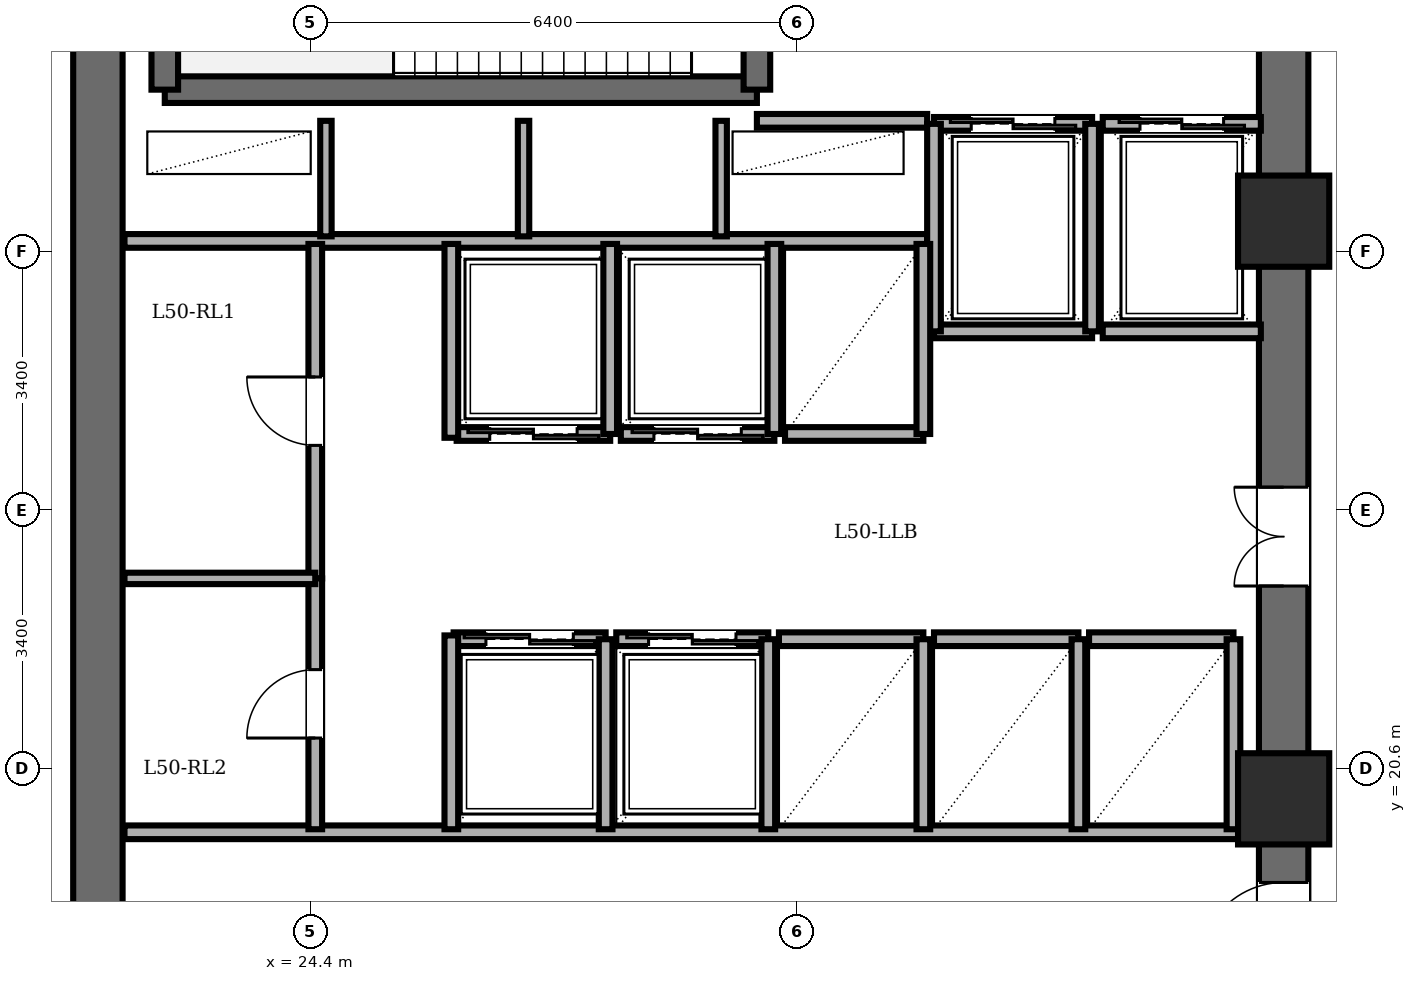
"""IFC4 building model, lengths in metres.
Left out: names, types, materials, properties, quantities, classifications, styles, units other than length and angle.
Written with IfcOpenShell. Run it as: python <this file> out.ifc"""

import sys

from ifc_helpers import new_model, si_unit, direction, frame, frame_2d, origin, origin_2d, place, context, subcontext, project, spatial, rectangle, extrude, element, fill, save


model = new_model("IFC4")
c1 = context("Model", 3, precision=1e-05, world=origin(), true_north=direction((0.0, 1.0)))
c2 = subcontext(c1, "Body", "Model", "MODEL_VIEW")
j1 = project(units=[si_unit("LENGTHUNIT", "METRE"), si_unit("PLANEANGLEUNIT", "RADIAN")], contexts=[c1])
p1 = place(None, origin())
s1 = spatial("IfcSite", under=j1, at=p1, CompositionType="ELEMENT")
p2 = place(p1, origin())
s2 = spatial("IfcBuilding", under=s1, at=p2, CompositionType="ELEMENT")
p3 = place(p2, frame((0.0, 0.0, 190.6)))
s3 = spatial("IfcBuildingStorey", under=s2, at=p3, CompositionType="ELEMENT", Elevation=190.6)
for number, where, z_axis, x_axis in (
    (1, (37.2, 20.2, 0.0), (0.0, 0.0, 1.0), (1.0, 0.0, 0.0)),
    (2, (37.2, 27.8, 0.0), (0.0, 0.0, 1.0), (1.0, 0.0, 0.0)),
):
    element("IfcColumn", number, at=place(p3, frame(where, z_axis=z_axis, x_axis=x_axis)), inside=s3, PredefinedType="COLUMN", context=c2, shape_type="SweptSolid", body=[
        extrude(rectangle(XDim=1.2, YDim=1.2, at=origin_2d()), origin(), (0.0, 0.0, 1.0), 5.6),
    ])
p4 = place(p3, frame((21.6, 14.4, 0.0), z_axis=(0.0, 0.0, 1.0), x_axis=(0.0, 1.0, 0.0)))
e3 = element("IfcWall", 3, at=p4, inside=s3, PredefinedType="SHEAR", context=c2, shape_type="SweptSolid", body=[
    extrude(rectangle(XDim=19.2, YDim=0.65, at=frame_2d((9.6, 0.0))), origin(), (0.0, 0.0, 1.0), 5.36),
])
p5 = place(p3, frame((37.2, 14.4, 0.0), z_axis=(0.0, 0.0, 1.0), x_axis=(0.0, 1.0, 0.0)))
e4 = element("IfcWall", 4, at=p5, inside=s3, PredefinedType="SHEAR", context=c2, shape_type="SweptSolid", body=[
    extrude(rectangle(XDim=19.2, YDim=0.65, at=frame_2d((9.6, 0.0))), origin(), (0.0, 0.0, 1.0), 5.36),
])
p6 = place(p5, frame((15.8, 0.0, 0.0)))
e5 = element("IfcOpeningElement", 5, at=p6, cuts=e4, PredefinedType="OPENING", context=c2, shape_type="SweptSolid", body=[
    extrude(rectangle(XDim=1.15, YDim=2.15, at=frame_2d((0.575, 1.075))), frame((0.0, 0.335, 0.0), z_axis=(0.0, -1.0, 0.0), x_axis=(1.0, 0.0, 0.0)), (0.0, 0.0, 1.0), 0.67),
])
p7 = place(p5, frame((3.6, 0.0, 0.0)))
e6 = element("IfcOpeningElement", 6, at=p7, cuts=e4, PredefinedType="OPENING", context=c2, shape_type="SweptSolid", body=[
    extrude(rectangle(XDim=1.1, YDim=2.15, at=frame_2d((0.55, 1.075))), frame((0.0, 0.335, 0.0), z_axis=(0.0, -1.0, 0.0), x_axis=(1.0, 0.0, 0.0)), (0.0, 0.0, 1.0), 0.67),
])
p8 = place(p5, frame((8.6, 0.0, 0.0)))
e7 = element("IfcOpeningElement", 7, at=p8, cuts=e4, PredefinedType="OPENING", context=c2, shape_type="SweptSolid", body=[
    extrude(rectangle(XDim=1.3, YDim=2.2, at=frame_2d((0.65, 1.1))), frame((0.0, 0.335, 0.0), z_axis=(0.0, -1.0, 0.0), x_axis=(1.0, 0.0, 0.0)), (0.0, 0.0, 1.0), 0.67),
])
p9 = place(p3, frame((22.48, 29.53, 0.0), z_axis=(0.0, 0.0, 1.0), x_axis=(1.0, 0.0, 0.0)))
e8 = element("IfcWall", 8, at=p9, inside=s3, PredefinedType="SOLIDWALL", context=c2, shape_type="SweptSolid", body=[
    extrude(rectangle(XDim=7.79, YDim=0.35, at=frame_2d((3.895, 0.0))), origin(), (0.0, 0.0, 1.0), 5.36),
])
p10 = place(p3, frame((22.48, 29.53, 0.0), z_axis=(0.0, 0.0, 1.0), x_axis=(0.0, 1.0, 0.0)))
e9 = element("IfcWall", 9, at=p10, inside=s3, PredefinedType="SOLIDWALL", context=c2, shape_type="SweptSolid", body=[
    extrude(rectangle(XDim=3.58, YDim=0.35, at=frame_2d((1.79, 0.0))), origin(), (0.0, 0.0, 1.0), 5.36),
])
p11 = place(p3, frame((30.27, 29.53, 0.0), z_axis=(0.0, 0.0, 1.0), x_axis=(0.0, 1.0, 0.0)))
e10 = element("IfcWall", 10, at=p11, inside=s3, PredefinedType="SOLIDWALL", context=c2, shape_type="SweptSolid", body=[
    extrude(rectangle(XDim=3.58, YDim=0.35, at=frame_2d((1.79, 0.0))), origin(), (0.0, 0.0, 1.0), 5.36),
])
p12 = place(p11, frame((1.25, 0.0, 0.0)))
e11 = element("IfcOpeningElement", 11, at=p12, cuts=e10, PredefinedType="OPENING", context=c2, shape_type="SweptSolid", body=[
    extrude(rectangle(XDim=1.1, YDim=2.15, at=frame_2d((0.55, 1.075))), frame((0.0, 0.185, 0.0), z_axis=(0.0, -1.0, 0.0), x_axis=(1.0, 0.0, 0.0)), (0.0, 0.0, 1.0), 0.37),
])
p13 = place(p3, frame((30.27, 29.12, 0.0), z_axis=(0.0, 0.0, 1.0), x_axis=(1.0, 0.0, 0.0)))
e12 = element("IfcWall", 12, at=p13, inside=s3, PredefinedType="PARTITIONING", context=c2, shape_type="SweptSolid", body=[
    extrude(rectangle(XDim=2.24, YDim=0.18, at=frame_2d((1.12, 0.0))), origin(), (0.0, 0.0, 1.0), 5.36),
])
p14 = place(p3, frame((21.95, 27.54, 0.0), z_axis=(0.0, 0.0, 1.0), x_axis=(1.0, 0.0, 0.0)))
e13 = element("IfcWall", 13, at=p14, inside=s3, PredefinedType="PARTITIONING", context=c2, shape_type="SweptSolid", body=[
    extrude(rectangle(XDim=10.56, YDim=0.18, at=frame_2d((5.28, 0.0))), origin(), (0.0, 0.0, 1.0), 5.36),
])
for number, where, z_axis, x_axis in (
    (14, (24.6, 27.6, 0.0), (0.0, 0.0, 1.0), (0.0, 1.0, 0.0)),
    (15, (27.2, 27.6, 0.0), (0.0, 0.0, 1.0), (0.0, 1.0, 0.0)),
    (16, (29.8, 27.6, 0.0), (0.0, 0.0, 1.0), (0.0, 1.0, 0.0)),
):
    element("IfcWall", number, at=place(p3, frame(where, z_axis=z_axis, x_axis=x_axis)), inside=s3, PredefinedType="PARTITIONING", context=c2, shape_type="SweptSolid", body=[
        extrude(rectangle(XDim=1.52, YDim=0.15, at=frame_2d((0.76, 0.0))), origin(), (0.0, 0.0, 1.0), 5.36),
    ])
p15 = place(p3, frame((21.95, 19.76, 0.0), z_axis=(0.0, 0.0, 1.0), x_axis=(1.0, 0.0, 0.0)))
e17 = element("IfcWall", 17, at=p15, inside=s3, PredefinedType="PARTITIONING", context=c2, shape_type="SweptSolid", body=[
    extrude(rectangle(XDim=14.87, YDim=0.18, at=frame_2d((7.435, 0.0))), origin(), (0.0, 0.0, 1.0), 5.36),
])
p16 = place(p3, frame((32.6, 29.08, 0.0), z_axis=(0.0, 0.0, 1.0), x_axis=(1.0, 0.0, 0.0)))
e18 = element("IfcWall", 18, at=p16, inside=s3, PredefinedType="PARTITIONING", context=c2, shape_type="SweptSolid", body=[
    extrude(rectangle(XDim=2.08, YDim=0.18, at=frame_2d((1.04, 0.0))), origin(), (0.0, 0.0, 1.0), 5.36),
])
p17 = place(p16, frame((0.49, 0.0, 0.0)))
e19 = element("IfcOpeningElement", 19, at=p17, cuts=e18, PredefinedType="OPENING", context=c2, shape_type="SweptSolid", body=[
    extrude(rectangle(XDim=1.1, YDim=2.2, at=frame_2d((0.55, 1.1))), frame((0.0, 0.1, 0.0), z_axis=(0.0, -1.0, 0.0), x_axis=(1.0, 0.0, 0.0)), (0.0, 0.0, 1.0), 0.2),
])
p18 = place(p3, frame((34.68, 26.35, 0.0), z_axis=(0.0, 0.0, 1.0), x_axis=(-1.0, 0.0, 0.0)))
e20 = element("IfcWall", 20, at=p18, inside=s3, PredefinedType="PARTITIONING", context=c2, shape_type="SweptSolid", body=[
    extrude(rectangle(XDim=2.08, YDim=0.18, at=frame_2d((1.04, 0.0))), origin(), (0.0, 0.0, 1.0), 5.36),
])
for number, where, z_axis, x_axis in (
    (21, (34.68, 26.35, 0.0), (0.0, 0.0, 1.0), (0.0, 1.0, 0.0)),
    (22, (32.6, 29.08, 0.0), (0.0, 0.0, 1.0), (0.0, -1.0, 0.0)),
):
    element("IfcWall", number, at=place(p3, frame(where, z_axis=z_axis, x_axis=x_axis)), inside=s3, PredefinedType="PARTITIONING", context=c2, shape_type="SweptSolid", body=[
        extrude(rectangle(XDim=2.73, YDim=0.18, at=frame_2d((1.365, 0.0))), origin(), (0.0, 0.0, 1.0), 5.36),
    ])
p19 = place(p3, frame((34.82, 29.08, 0.0), z_axis=(0.0, 0.0, 1.0), x_axis=(1.0, 0.0, 0.0)))
e23 = element("IfcWall", 23, at=p19, inside=s3, PredefinedType="PARTITIONING", context=c2, shape_type="SweptSolid", body=[
    extrude(rectangle(XDim=2.08, YDim=0.18, at=frame_2d((1.04, 0.0))), origin(), (0.0, 0.0, 1.0), 5.36),
])
p20 = place(p19, frame((0.49, 0.0, 0.0)))
e24 = element("IfcOpeningElement", 24, at=p20, cuts=e23, PredefinedType="OPENING", context=c2, shape_type="SweptSolid", body=[
    extrude(rectangle(XDim=1.1, YDim=2.2, at=frame_2d((0.55, 1.1))), frame((0.0, 0.1, 0.0), z_axis=(0.0, -1.0, 0.0), x_axis=(1.0, 0.0, 0.0)), (0.0, 0.0, 1.0), 0.2),
])
p21 = place(p3, frame((36.9, 26.35, 0.0), z_axis=(0.0, 0.0, 1.0), x_axis=(-1.0, 0.0, 0.0)))
e25 = element("IfcWall", 25, at=p21, inside=s3, PredefinedType="PARTITIONING", context=c2, shape_type="SweptSolid", body=[
    extrude(rectangle(XDim=2.08, YDim=0.18, at=frame_2d((1.04, 0.0))), origin(), (0.0, 0.0, 1.0), 5.36),
])
p22 = place(p3, frame((28.34, 25.0, 0.0), z_axis=(0.0, 0.0, 1.0), x_axis=(-1.0, 0.0, 0.0)))
e26 = element("IfcWall", 26, at=p22, inside=s3, PredefinedType="PARTITIONING", context=c2, shape_type="SweptSolid", body=[
    extrude(rectangle(XDim=2.02, YDim=0.18, at=frame_2d((1.01, 0.0))), origin(), (0.0, 0.0, 1.0), 5.36),
])
p23 = place(p22, frame((0.435, 0.0, 0.0)))
e27 = element("IfcOpeningElement", 27, at=p23, cuts=e26, PredefinedType="OPENING", context=c2, shape_type="SweptSolid", body=[
    extrude(rectangle(XDim=1.15, YDim=2.2, at=frame_2d((0.575, 1.1))), frame((0.0, 0.1, 0.0), z_axis=(0.0, -1.0, 0.0), x_axis=(1.0, 0.0, 0.0)), (0.0, 0.0, 1.0), 0.2),
])
p24 = place(p3, frame((28.34, 25.0, 0.0), z_axis=(0.0, 0.0, 1.0), x_axis=(0.0, 1.0, 0.0)))
e28 = element("IfcWall", 28, at=p24, inside=s3, PredefinedType="PARTITIONING", context=c2, shape_type="SweptSolid", body=[
    extrude(rectangle(XDim=2.5, YDim=0.18, at=frame_2d((1.25, 0.0))), origin(), (0.0, 0.0, 1.0), 5.36),
])
p25 = place(p3, frame((30.5, 25.0, 0.0), z_axis=(0.0, 0.0, 1.0), x_axis=(-1.0, 0.0, 0.0)))
e29 = element("IfcWall", 29, at=p25, inside=s3, PredefinedType="PARTITIONING", context=c2, shape_type="SweptSolid", body=[
    extrude(rectangle(XDim=2.02, YDim=0.18, at=frame_2d((1.01, 0.0))), origin(), (0.0, 0.0, 1.0), 5.36),
])
p26 = place(p25, frame((0.435, 0.0, 0.0)))
e30 = element("IfcOpeningElement", 30, at=p26, cuts=e29, PredefinedType="OPENING", context=c2, shape_type="SweptSolid", body=[
    extrude(rectangle(XDim=1.15, YDim=2.2, at=frame_2d((0.575, 1.1))), frame((0.0, 0.1, 0.0), z_axis=(0.0, -1.0, 0.0), x_axis=(1.0, 0.0, 0.0)), (0.0, 0.0, 1.0), 0.2),
])
p27 = place(p3, frame((30.5, 25.0, 0.0), z_axis=(0.0, 0.0, 1.0), x_axis=(0.0, 1.0, 0.0)))
e31 = element("IfcWall", 31, at=p27, inside=s3, PredefinedType="PARTITIONING", context=c2, shape_type="SweptSolid", body=[
    extrude(rectangle(XDim=2.5, YDim=0.18, at=frame_2d((1.25, 0.0))), origin(), (0.0, 0.0, 1.0), 5.36),
])
p28 = place(p3, frame((26.28, 22.3, 0.0), z_axis=(0.0, 0.0, 1.0), x_axis=(1.0, 0.0, 0.0)))
e32 = element("IfcWall", 32, at=p28, inside=s3, PredefinedType="PARTITIONING", context=c2, shape_type="SweptSolid", body=[
    extrude(rectangle(XDim=2.0, YDim=0.18, at=frame_2d((1.0, 0.0))), origin(), (0.0, 0.0, 1.0), 5.36),
])
p29 = place(p28, frame((0.425, 0.0, 0.0)))
e33 = element("IfcOpeningElement", 33, at=p29, cuts=e32, PredefinedType="OPENING", context=c2, shape_type="SweptSolid", body=[
    extrude(rectangle(XDim=1.15, YDim=2.2, at=frame_2d((0.575, 1.1))), frame((0.0, 0.1, 0.0), z_axis=(0.0, -1.0, 0.0), x_axis=(1.0, 0.0, 0.0)), (0.0, 0.0, 1.0), 0.2),
])
p30 = place(p3, frame((28.28, 19.8, 0.0), z_axis=(0.0, 0.0, 1.0), x_axis=(0.0, 1.0, 0.0)))
e34 = element("IfcWall", 34, at=p30, inside=s3, PredefinedType="PARTITIONING", context=c2, shape_type="SweptSolid", body=[
    extrude(rectangle(XDim=2.5, YDim=0.18, at=frame_2d((1.25, 0.0))), origin(), (0.0, 0.0, 1.0), 5.36),
])
p31 = place(p3, frame((28.42, 22.3, 0.0), z_axis=(0.0, 0.0, 1.0), x_axis=(1.0, 0.0, 0.0)))
e35 = element("IfcWall", 35, at=p31, inside=s3, PredefinedType="PARTITIONING", context=c2, shape_type="SweptSolid", body=[
    extrude(rectangle(XDim=2.0, YDim=0.18, at=frame_2d((1.0, 0.0))), origin(), (0.0, 0.0, 1.0), 5.36),
])
p32 = place(p31, frame((0.425, 0.0, 0.0)))
e36 = element("IfcOpeningElement", 36, at=p32, cuts=e35, PredefinedType="OPENING", context=c2, shape_type="SweptSolid", body=[
    extrude(rectangle(XDim=1.15, YDim=2.2, at=frame_2d((0.575, 1.1))), frame((0.0, 0.1, 0.0), z_axis=(0.0, -1.0, 0.0), x_axis=(1.0, 0.0, 0.0)), (0.0, 0.0, 1.0), 0.2),
])
p33 = place(p3, frame((30.42, 19.8, 0.0), z_axis=(0.0, 0.0, 1.0), x_axis=(0.0, 1.0, 0.0)))
e37 = element("IfcWall", 37, at=p33, inside=s3, PredefinedType="PARTITIONING", context=c2, shape_type="SweptSolid", body=[
    extrude(rectangle(XDim=2.5, YDim=0.18, at=frame_2d((1.25, 0.0))), origin(), (0.0, 0.0, 1.0), 5.36),
])
p34 = place(p3, frame((32.46, 25.0, 0.0), z_axis=(0.0, 0.0, 1.0), x_axis=(-1.0, 0.0, 0.0)))
e38 = element("IfcWall", 38, at=p34, inside=s3, PredefinedType="PARTITIONING", context=c2, shape_type="SweptSolid", body=[
    extrude(rectangle(XDim=1.82, YDim=0.18, at=frame_2d((0.91, 0.0))), origin(), (0.0, 0.0, 1.0), 5.36),
])
p35 = place(p3, frame((32.46, 25.0, 0.0), z_axis=(0.0, 0.0, 1.0), x_axis=(0.0, 1.0, 0.0)))
e39 = element("IfcWall", 39, at=p35, inside=s3, PredefinedType="PARTITIONING", context=c2, shape_type="SweptSolid", body=[
    extrude(rectangle(XDim=2.5, YDim=0.18, at=frame_2d((1.25, 0.0))), origin(), (0.0, 0.0, 1.0), 5.36),
])
p36 = place(p3, frame((30.56, 22.3, 0.0), z_axis=(0.0, 0.0, 1.0), x_axis=(1.0, 0.0, 0.0)))
e40 = element("IfcWall", 40, at=p36, inside=s3, PredefinedType="PARTITIONING", context=c2, shape_type="SweptSolid", body=[
    extrude(rectangle(XDim=1.9, YDim=0.18, at=frame_2d((0.95, 0.0))), origin(), (0.0, 0.0, 1.0), 5.36),
])
p37 = place(p3, frame((32.46, 19.8, 0.0), z_axis=(0.0, 0.0, 1.0), x_axis=(0.0, 1.0, 0.0)))
e41 = element("IfcWall", 41, at=p37, inside=s3, PredefinedType="PARTITIONING", context=c2, shape_type="SweptSolid", body=[
    extrude(rectangle(XDim=2.5, YDim=0.18, at=frame_2d((1.25, 0.0))), origin(), (0.0, 0.0, 1.0), 5.36),
])
p38 = place(p3, frame((32.6, 22.3, 0.0), z_axis=(0.0, 0.0, 1.0), x_axis=(1.0, 0.0, 0.0)))
e42 = element("IfcWall", 42, at=p38, inside=s3, PredefinedType="PARTITIONING", context=c2, shape_type="SweptSolid", body=[
    extrude(rectangle(XDim=1.9, YDim=0.18, at=frame_2d((0.95, 0.0))), origin(), (0.0, 0.0, 1.0), 5.36),
])
p39 = place(p3, frame((34.5, 19.8, 0.0), z_axis=(0.0, 0.0, 1.0), x_axis=(0.0, 1.0, 0.0)))
e43 = element("IfcWall", 43, at=p39, inside=s3, PredefinedType="PARTITIONING", context=c2, shape_type="SweptSolid", body=[
    extrude(rectangle(XDim=2.5, YDim=0.18, at=frame_2d((1.25, 0.0))), origin(), (0.0, 0.0, 1.0), 5.36),
])
p40 = place(p3, frame((34.64, 22.3, 0.0), z_axis=(0.0, 0.0, 1.0), x_axis=(1.0, 0.0, 0.0)))
e44 = element("IfcWall", 44, at=p40, inside=s3, PredefinedType="PARTITIONING", context=c2, shape_type="SweptSolid", body=[
    extrude(rectangle(XDim=1.9, YDim=0.18, at=frame_2d((0.95, 0.0))), origin(), (0.0, 0.0, 1.0), 5.36),
])
p41 = place(p3, frame((36.54, 19.8, 0.0), z_axis=(0.0, 0.0, 1.0), x_axis=(0.0, 1.0, 0.0)))
e45 = element("IfcWall", 45, at=p41, inside=s3, PredefinedType="PARTITIONING", context=c2, shape_type="SweptSolid", body=[
    extrude(rectangle(XDim=2.5, YDim=0.18, at=frame_2d((1.25, 0.0))), origin(), (0.0, 0.0, 1.0), 5.36),
])
p42 = place(p3, frame((24.46, 23.1, 0.0), z_axis=(0.0, 0.0, 1.0), x_axis=(0.0, 1.0, 0.0)))
e46 = element("IfcWall", 46, at=p42, inside=s3, PredefinedType="PARTITIONING", context=c2, shape_type="SweptSolid", body=[
    extrude(rectangle(XDim=4.4, YDim=0.18, at=frame_2d((2.2, 0.0))), origin(), (0.0, 0.0, 1.0), 5.36),
])
p43 = place(p42, frame((1.75, 0.0, 0.0)))
e47 = element("IfcOpeningElement", 47, at=p43, cuts=e46, PredefinedType="OPENING", context=c2, shape_type="SweptSolid", body=[
    extrude(rectangle(XDim=0.9, YDim=2.05, at=frame_2d((0.45, 1.025))), frame((0.0, 0.1, 0.0), z_axis=(0.0, -1.0, 0.0), x_axis=(1.0, 0.0, 0.0)), (0.0, 0.0, 1.0), 0.2),
])
p44 = place(p3, frame((24.46, 19.8, 0.0), z_axis=(0.0, 0.0, 1.0), x_axis=(0.0, 1.0, 0.0)))
e48 = element("IfcWall", 48, at=p44, inside=s3, PredefinedType="PARTITIONING", context=c2, shape_type="SweptSolid", body=[
    extrude(rectangle(XDim=3.3, YDim=0.18, at=frame_2d((1.65, 0.0))), origin(), (0.0, 0.0, 1.0), 5.36),
])
p45 = place(p44, frame((1.2, 0.0, 0.0)))
e49 = element("IfcOpeningElement", 49, at=p45, cuts=e48, PredefinedType="OPENING", context=c2, shape_type="SweptSolid", body=[
    extrude(rectangle(XDim=0.9, YDim=2.05, at=frame_2d((0.45, 1.025))), frame((0.0, 0.1, 0.0), z_axis=(0.0, -1.0, 0.0), x_axis=(1.0, 0.0, 0.0)), (0.0, 0.0, 1.0), 0.2),
])
p46 = place(p3, frame((21.95, 23.1, 0.0), z_axis=(0.0, 0.0, 1.0), x_axis=(1.0, 0.0, 0.0)))
e50 = element("IfcWall", 50, at=p46, inside=s3, PredefinedType="PARTITIONING", context=c2, shape_type="SweptSolid", body=[
    extrude(rectangle(XDim=2.51, YDim=0.15, at=frame_2d((1.255, 0.0))), origin(), (0.0, 0.0, 1.0), 5.36),
])
for number, where, z_axis, x_axis in (
    (51, (26.25, 24.95, 0.0), (0.0, 0.0, 1.0), (0.0, 1.0, 0.0)),
    (52, (26.25, 19.8, 0.0), (0.0, 0.0, 1.0), (0.0, 1.0, 0.0)),
):
    element("IfcWall", number, at=place(p3, frame(where, z_axis=z_axis, x_axis=x_axis)), inside=s3, PredefinedType="PARTITIONING", context=c2, shape_type="SweptSolid", body=[
        extrude(rectangle(XDim=2.55, YDim=0.18, at=frame_2d((1.275, 0.0))), origin(), (0.0, 0.0, 1.0), 5.36),
    ])
p47 = place(p7, origin())
e53 = element("IfcDoor", 53, at=p47, inside=s3, OperationType="SINGLE_SWING_LEFT", PredefinedType="DOOR", context=c2, shape_type="SweptSolid", body=[
    extrude(rectangle(XDim=1.1, YDim=2.15, at=frame_2d((0.55, 1.075))), frame((0.0, 0.025, 0.0), z_axis=(0.0, -1.0, 0.0), x_axis=(1.0, 0.0, 0.0)), (0.0, 0.0, 1.0), 0.05),
])
fill(e6, e53)
p48 = place(p17, origin())
e54 = element("IfcDoor", 54, at=p48, inside=s3, OperationType="DOUBLE_DOOR_SLIDING", PredefinedType="DOOR", context=c2, shape_type="SweptSolid", body=[
    extrude(rectangle(XDim=1.1, YDim=2.2, at=frame_2d((0.55, 1.1))), frame((0.0, 0.025, 0.0), z_axis=(0.0, -1.0, 0.0), x_axis=(1.0, 0.0, 0.0)), (0.0, 0.0, 1.0), 0.05),
])
fill(e19, e54)
p49 = place(p20, origin())
e55 = element("IfcDoor", 55, at=p49, inside=s3, OperationType="DOUBLE_DOOR_SLIDING", PredefinedType="DOOR", context=c2, shape_type="SweptSolid", body=[
    extrude(rectangle(XDim=1.1, YDim=2.2, at=frame_2d((0.55, 1.1))), frame((0.0, 0.025, 0.0), z_axis=(0.0, -1.0, 0.0), x_axis=(1.0, 0.0, 0.0)), (0.0, 0.0, 1.0), 0.05),
])
fill(e24, e55)
p50 = place(p23, origin())
e56 = element("IfcDoor", 56, at=p50, inside=s3, OperationType="DOUBLE_DOOR_SLIDING", PredefinedType="DOOR", context=c2, shape_type="SweptSolid", body=[
    extrude(rectangle(XDim=1.15, YDim=2.2, at=frame_2d((0.575, 1.1))), frame((0.0, 0.025, 0.0), z_axis=(0.0, -1.0, 0.0), x_axis=(1.0, 0.0, 0.0)), (0.0, 0.0, 1.0), 0.05),
])
fill(e27, e56)
p51 = place(p26, origin())
e57 = element("IfcDoor", 57, at=p51, inside=s3, OperationType="DOUBLE_DOOR_SLIDING", PredefinedType="DOOR", context=c2, shape_type="SweptSolid", body=[
    extrude(rectangle(XDim=1.15, YDim=2.2, at=frame_2d((0.575, 1.1))), frame((0.0, 0.025, 0.0), z_axis=(0.0, -1.0, 0.0), x_axis=(1.0, 0.0, 0.0)), (0.0, 0.0, 1.0), 0.05),
])
fill(e30, e57)
p52 = place(p29, origin())
e58 = element("IfcDoor", 58, at=p52, inside=s3, OperationType="DOUBLE_DOOR_SLIDING", PredefinedType="DOOR", context=c2, shape_type="SweptSolid", body=[
    extrude(rectangle(XDim=1.15, YDim=2.2, at=frame_2d((0.575, 1.1))), frame((0.0, 0.025, 0.0), z_axis=(0.0, -1.0, 0.0), x_axis=(1.0, 0.0, 0.0)), (0.0, 0.0, 1.0), 0.05),
])
fill(e33, e58)
p53 = place(p32, origin())
e59 = element("IfcDoor", 59, at=p53, inside=s3, OperationType="DOUBLE_DOOR_SLIDING", PredefinedType="DOOR", context=c2, shape_type="SweptSolid", body=[
    extrude(rectangle(XDim=1.15, YDim=2.2, at=frame_2d((0.575, 1.1))), frame((0.0, 0.025, 0.0), z_axis=(0.0, -1.0, 0.0), x_axis=(1.0, 0.0, 0.0)), (0.0, 0.0, 1.0), 0.05),
])
fill(e36, e59)
p54 = place(p43, origin())
e60 = element("IfcDoor", 60, at=p54, inside=s3, OperationType="SINGLE_SWING_RIGHT", PredefinedType="DOOR", context=c2, shape_type="SweptSolid", body=[
    extrude(rectangle(XDim=0.9, YDim=2.05, at=frame_2d((0.45, 1.025))), frame((0.0, 0.025, 0.0), z_axis=(0.0, -1.0, 0.0), x_axis=(1.0, 0.0, 0.0)), (0.0, 0.0, 1.0), 0.05),
])
fill(e47, e60)
p55 = place(p45, origin())
e61 = element("IfcDoor", 61, at=p55, inside=s3, OperationType="SINGLE_SWING_LEFT", PredefinedType="DOOR", context=c2, shape_type="SweptSolid", body=[
    extrude(rectangle(XDim=0.9, YDim=2.05, at=frame_2d((0.45, 1.025))), frame((0.0, 0.025, 0.0), z_axis=(0.0, -1.0, 0.0), x_axis=(1.0, 0.0, 0.0)), (0.0, 0.0, 1.0), 0.05),
])
fill(e49, e61)
p56 = place(p8, origin())
e62 = element("IfcDoor", 62, at=p56, inside=s3, OperationType="DOUBLE_DOOR_SINGLE_SWING", PredefinedType="DOOR", context=c2, shape_type="SweptSolid", body=[
    extrude(rectangle(XDim=1.3, YDim=2.2, at=frame_2d((0.65, 1.1))), frame((0.0, 0.025, 0.0), z_axis=(0.0, -1.0, 0.0), x_axis=(1.0, 0.0, 0.0)), (0.0, 0.0, 1.0), 0.05),
])
fill(e7, e62)
save(model, sys.argv[1])
